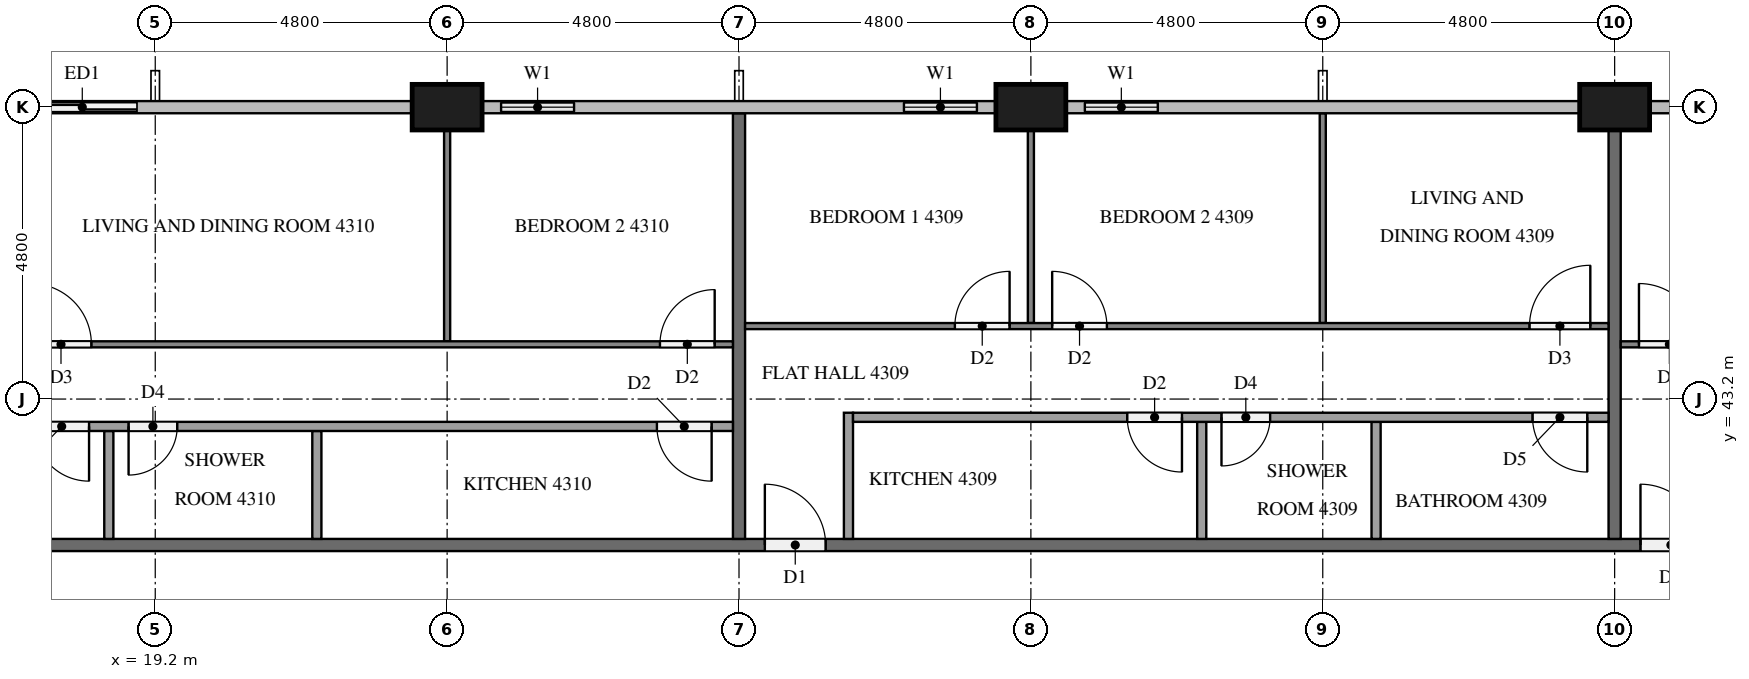
"""IFC4 building model, lengths in metres.
Left out: names, types, materials, properties, quantities, classifications, styles, units other than length and angle.
Written with IfcOpenShell. Run it as: python <this file> out.ifc"""

import sys

from ifc_helpers import new_model, si_unit, direction, frame, frame_2d, origin, origin_2d, place, context, subcontext, project, spatial, rectangle, extrude, element, fill, save


model = new_model("IFC4")
c1 = context("Model", 3, precision=1e-05, world=origin(), true_north=direction((0.0, 1.0)))
c2 = subcontext(c1, "Body", "Model", "MODEL_VIEW")
j1 = project(units=[si_unit("LENGTHUNIT", "METRE"), si_unit("PLANEANGLEUNIT", "RADIAN")], contexts=[c1])
p1 = place(None, origin())
s1 = spatial("IfcSite", under=j1, at=p1, CompositionType="ELEMENT")
p2 = place(p1, origin())
s2 = spatial("IfcBuilding", under=s1, at=p2, CompositionType="ELEMENT")
p3 = place(p2, frame((0.0, 0.0, 166.5)))
s3 = spatial("IfcBuildingStorey", under=s2, at=p3, CompositionType="ELEMENT", Elevation=166.5)
for number, where, z_axis, x_axis in (
    (1, (43.2, 48.0, 0.0), (0.0, 0.0, 1.0), (1.0, 0.0, 0.0)),
    (2, (33.6, 48.0, 0.0), (0.0, 0.0, 1.0), (1.0, 0.0, 0.0)),
    (3, (24.0, 48.0, 0.0), (0.0, 0.0, 1.0), (1.0, 0.0, 0.0)),
):
    element("IfcColumn", number, at=place(p3, frame(where, z_axis=z_axis, x_axis=x_axis)), inside=s3, PredefinedType="COLUMN", context=c2, shape_type="SweptSolid", body=[
        extrude(rectangle(XDim=1.15, YDim=0.75, at=origin_2d()), origin(), (0.0, 0.0, 1.0), 3.2),
    ])
p4 = place(p3, frame((36.0, 48.0, 0.0), z_axis=(0.0, 0.0, 1.0), x_axis=(-1.0, 0.0, 0.0)))
e4 = element("IfcWall", 4, at=p4, inside=s3, PredefinedType="SOLIDWALL", context=c2, shape_type="SweptSolid", body=[
    extrude(rectangle(XDim=1.825, YDim=0.15, at=frame_2d((0.913, 0.0))), origin(), (0.0, 0.0, 1.0), 3.2),
])
p5 = place(p4, frame((0.312, 0.0, 0.9)))
e5 = element("IfcOpeningElement", 5, at=p5, cuts=e4, PredefinedType="OPENING", context=c2, shape_type="SweptSolid", body=[
    extrude(rectangle(XDim=1.2, YDim=1.4, at=frame_2d((0.6, 0.7))), frame((0.0, 0.085, 0.0), z_axis=(0.0, -1.0, 0.0), x_axis=(1.0, 0.0, 0.0)), (0.0, 0.0, 1.0), 0.17),
])
p6 = place(p3, frame((33.025, 48.0, 0.0), z_axis=(0.0, 0.0, 1.0), x_axis=(-1.0, 0.0, 0.0)))
e6 = element("IfcWall", 6, at=p6, inside=s3, PredefinedType="SOLIDWALL", context=c2, shape_type="SweptSolid", body=[
    extrude(rectangle(XDim=1.825, YDim=0.15, at=frame_2d((0.913, 0.0))), origin(), (0.0, 0.0, 1.0), 3.2),
])
p7 = place(p6, frame((0.312, 0.0, 0.9)))
e7 = element("IfcOpeningElement", 7, at=p7, cuts=e6, PredefinedType="OPENING", context=c2, shape_type="SweptSolid", body=[
    extrude(rectangle(XDim=1.2, YDim=1.4, at=frame_2d((0.6, 0.7))), frame((0.0, 0.085, 0.0), z_axis=(0.0, -1.0, 0.0), x_axis=(1.0, 0.0, 0.0)), (0.0, 0.0, 1.0), 0.17),
])
p8 = place(p3, frame((26.4, 48.0, 0.0), z_axis=(0.0, 0.0, 1.0), x_axis=(-1.0, 0.0, 0.0)))
e8 = element("IfcWall", 8, at=p8, inside=s3, PredefinedType="SOLIDWALL", context=c2, shape_type="SweptSolid", body=[
    extrude(rectangle(XDim=1.825, YDim=0.15, at=frame_2d((0.913, 0.0))), origin(), (0.0, 0.0, 1.0), 3.2),
])
p9 = place(p8, frame((0.312, 0.0, 0.9)))
e9 = element("IfcOpeningElement", 9, at=p9, cuts=e8, PredefinedType="OPENING", context=c2, shape_type="SweptSolid", body=[
    extrude(rectangle(XDim=1.2, YDim=1.4, at=frame_2d((0.6, 0.7))), frame((0.0, 0.085, 0.0), z_axis=(0.0, -1.0, 0.0), x_axis=(1.0, 0.0, 0.0)), (0.0, 0.0, 1.0), 0.17),
])
p10 = place(p3, frame((19.2, 48.0, 0.0), z_axis=(0.0, 0.0, 1.0), x_axis=(-1.0, 0.0, 0.0)))
e10 = element("IfcWall", 10, at=p10, inside=s3, PredefinedType="SOLIDWALL", context=c2, shape_type="SweptSolid", body=[
    extrude(rectangle(XDim=4.225, YDim=0.15, at=frame_2d((2.112, 0.0))), origin(), (0.0, 0.0, 1.0), 3.2),
])
p11 = place(p10, frame((0.3, 0.0, 0.0)))
e11 = element("IfcOpeningElement", 11, at=p11, cuts=e10, PredefinedType="OPENING", context=c2, shape_type="SweptSolid", body=[
    extrude(rectangle(XDim=1.8, YDim=2.4, at=frame_2d((0.9, 1.2))), frame((0.0, 0.085, 0.0), z_axis=(0.0, -1.0, 0.0), x_axis=(1.0, 0.0, 0.0)), (0.0, 0.0, 1.0), 0.17),
])
p12 = place(p10, frame((2.712, 0.0, 0.9)))
e12 = element("IfcOpeningElement", 12, at=p12, cuts=e10, PredefinedType="OPENING", context=c2, shape_type="SweptSolid", body=[
    extrude(rectangle(XDim=1.2, YDim=1.4, at=frame_2d((0.6, 0.7))), frame((0.0, 0.085, 0.0), z_axis=(0.0, -1.0, 0.0), x_axis=(1.0, 0.0, 0.0)), (0.0, 0.0, 1.0), 0.17),
])
p13 = place(p3, frame((11.9, 40.8, 0.0), z_axis=(0.0, 0.0, 1.0), x_axis=(1.0, 0.0, 0.0)))
e13 = element("IfcWall", 13, at=p13, inside=s3, PredefinedType="PARTITIONING", context=c2, shape_type="SweptSolid", body=[
    extrude(rectangle(XDim=38.6, YDim=0.2, at=frame_2d((19.3, 0.0))), origin(), (0.0, 0.0, 1.0), 3.2),
])
p14 = place(p13, frame((31.725, 0.0, 0.0)))
e14 = element("IfcOpeningElement", 14, at=p14, cuts=e13, PredefinedType="OPENING", context=c2, shape_type="SweptSolid", body=[
    extrude(rectangle(XDim=1.0, YDim=2.1, at=frame_2d((0.5, 1.05))), frame((0.0, 0.11, 0.0), z_axis=(0.0, -1.0, 0.0), x_axis=(1.0, 0.0, 0.0)), (0.0, 0.0, 1.0), 0.22),
])
p15 = place(p13, frame((17.325, 0.0, 0.0)))
e15 = element("IfcOpeningElement", 15, at=p15, cuts=e13, PredefinedType="OPENING", context=c2, shape_type="SweptSolid", body=[
    extrude(rectangle(XDim=1.0, YDim=2.1, at=frame_2d((0.5, 1.05))), frame((0.0, 0.11, 0.0), z_axis=(0.0, -1.0, 0.0), x_axis=(1.0, 0.0, 0.0)), (0.0, 0.0, 1.0), 0.22),
])
p16 = place(p13, frame((0.525, 0.0, 0.0)))
e16 = element("IfcOpeningElement", 16, at=p16, cuts=e13, PredefinedType="OPENING", context=c2, shape_type="SweptSolid", body=[
    extrude(rectangle(XDim=1.0, YDim=2.1, at=frame_2d((0.5, 1.05))), frame((0.0, 0.11, 0.0), z_axis=(0.0, -1.0, 0.0), x_axis=(1.0, 0.0, 0.0)), (0.0, 0.0, 1.0), 0.22),
])
p17 = place(p3, frame((43.2, 47.625, 0.0), z_axis=(0.0, 0.0, 1.0), x_axis=(0.0, -1.0, 0.0)))
e17 = element("IfcWall", 17, at=p17, inside=s3, PredefinedType="PARTITIONING", context=c2, shape_type="SweptSolid", body=[
    extrude(rectangle(XDim=6.725, YDim=0.2, at=frame_2d((3.363, 0.0))), origin(), (0.0, 0.0, 1.0), 3.2),
])
p18 = place(p3, frame((28.8, 47.9, 0.0), z_axis=(0.0, 0.0, 1.0), x_axis=(0.0, -1.0, 0.0)))
e18 = element("IfcWall", 18, at=p18, inside=s3, PredefinedType="PARTITIONING", context=c2, shape_type="SweptSolid", body=[
    extrude(rectangle(XDim=7.0, YDim=0.2, at=frame_2d((3.5, 0.0))), origin(), (0.0, 0.0, 1.0), 3.2),
])
p19 = place(p3, frame((43.3, 44.1, 0.0), z_axis=(0.0, 0.0, 1.0), x_axis=(1.0, 0.0, 0.0)))
e19 = element("IfcWall", 19, at=p19, inside=s3, PredefinedType="PARTITIONING", context=c2, shape_type="SweptSolid", body=[
    extrude(rectangle(XDim=7.0, YDim=0.1, at=frame_2d((3.5, 0.0))), origin(), (0.0, 0.0, 1.0), 3.2),
])
p20 = place(p19, frame((0.3, 0.0, 0.0)))
e20 = element("IfcOpeningElement", 20, at=p20, cuts=e19, PredefinedType="OPENING", context=c2, shape_type="SweptSolid", body=[
    extrude(rectangle(XDim=1.0, YDim=2.1, at=frame_2d((0.5, 1.05))), frame((0.0, 0.06, 0.0), z_axis=(0.0, -1.0, 0.0), x_axis=(1.0, 0.0, 0.0)), (0.0, 0.0, 1.0), 0.12),
])
p21 = place(p3, frame((33.6, 44.45, 0.0), z_axis=(0.0, 0.0, 1.0), x_axis=(0.0, 1.0, 0.0)))
e21 = element("IfcWall", 21, at=p21, inside=s3, PredefinedType="PARTITIONING", context=c2, shape_type="SweptSolid", body=[
    extrude(rectangle(XDim=3.175, YDim=0.1, at=frame_2d((1.587, 0.0))), origin(), (0.0, 0.0, 1.0), 3.2),
])
p22 = place(p3, frame((38.4, 44.45, 0.0), z_axis=(0.0, 0.0, 1.0), x_axis=(0.0, 1.0, 0.0)))
e22 = element("IfcWall", 22, at=p22, inside=s3, PredefinedType="PARTITIONING", context=c2, shape_type="SweptSolid", body=[
    extrude(rectangle(XDim=3.45, YDim=0.1, at=frame_2d((1.725, 0.0))), origin(), (0.0, 0.0, 1.0), 3.2),
])
p23 = place(p3, frame((28.9, 44.4, 0.0), z_axis=(0.0, 0.0, 1.0), x_axis=(1.0, 0.0, 0.0)))
e23 = element("IfcWall", 23, at=p23, inside=s3, PredefinedType="PARTITIONING", context=c2, shape_type="SweptSolid", body=[
    extrude(rectangle(XDim=14.2, YDim=0.1, at=frame_2d((7.1, 0.0))), origin(), (0.0, 0.0, 1.0), 3.2),
])
p24 = place(p23, frame((3.45, 0.0, 0.0)))
e24 = element("IfcOpeningElement", 24, at=p24, cuts=e23, PredefinedType="OPENING", context=c2, shape_type="SweptSolid", body=[
    extrude(rectangle(XDim=0.9, YDim=2.1, at=frame_2d((0.45, 1.05))), frame((0.0, 0.06, 0.0), z_axis=(0.0, -1.0, 0.0), x_axis=(1.0, 0.0, 0.0)), (0.0, 0.0, 1.0), 0.12),
])
p25 = place(p23, frame((5.05, 0.0, 0.0)))
e25 = element("IfcOpeningElement", 25, at=p25, cuts=e23, PredefinedType="OPENING", context=c2, shape_type="SweptSolid", body=[
    extrude(rectangle(XDim=0.9, YDim=2.1, at=frame_2d((0.45, 1.05))), frame((0.0, 0.06, 0.0), z_axis=(0.0, -1.0, 0.0), x_axis=(1.0, 0.0, 0.0)), (0.0, 0.0, 1.0), 0.12),
])
p26 = place(p23, frame((12.9, 0.0, 0.0)))
e26 = element("IfcOpeningElement", 26, at=p26, cuts=e23, PredefinedType="OPENING", context=c2, shape_type="SweptSolid", body=[
    extrude(rectangle(XDim=1.0, YDim=2.1, at=frame_2d((0.5, 1.05))), frame((0.0, 0.06, 0.0), z_axis=(0.0, -1.0, 0.0), x_axis=(1.0, 0.0, 0.0)), (0.0, 0.0, 1.0), 0.12),
])
for number, where, z_axis, x_axis in (
    (27, (36.41, 40.9, 0.0), (0.0, 0.0, 1.0), (0.0, 1.0, 0.0)),
    (28, (39.277, 40.9, 0.0), (0.0, 0.0, 1.0), (0.0, 1.0, 0.0)),
):
    element("IfcWall", number, at=place(p3, frame(where, z_axis=z_axis, x_axis=x_axis)), inside=s3, PredefinedType="PARTITIONING", context=c2, shape_type="SweptSolid", body=[
        extrude(rectangle(XDim=1.925, YDim=0.15, at=frame_2d((0.962, 0.0))), origin(), (0.0, 0.0, 1.0), 3.2),
    ])
p27 = place(p3, frame((30.6, 40.9, 0.0), z_axis=(0.0, 0.0, 1.0), x_axis=(0.0, 1.0, 0.0)))
e29 = element("IfcWall", 29, at=p27, inside=s3, PredefinedType="PARTITIONING", context=c2, shape_type="SweptSolid", body=[
    extrude(rectangle(XDim=2.075, YDim=0.15, at=frame_2d((1.038, 0.0))), origin(), (0.0, 0.0, 1.0), 3.2),
])
p28 = place(p3, frame((43.1, 42.9, 0.0), z_axis=(0.0, 0.0, 1.0), x_axis=(-1.0, 0.0, 0.0)))
e30 = element("IfcWall", 30, at=p28, inside=s3, PredefinedType="PARTITIONING", context=c2, shape_type="SweptSolid", body=[
    extrude(rectangle(XDim=12.425, YDim=0.15, at=frame_2d((6.212, 0.0))), origin(), (0.0, 0.0, 1.0), 3.2),
])
p29 = place(p28, frame((7.015, 0.0, 0.0)))
e31 = element("IfcOpeningElement", 31, at=p29, cuts=e30, PredefinedType="OPENING", context=c2, shape_type="SweptSolid", body=[
    extrude(rectangle(XDim=0.9, YDim=2.1, at=frame_2d((0.45, 1.05))), frame((0.0, 0.085, 0.0), z_axis=(0.0, -1.0, 0.0), x_axis=(1.0, 0.0, 0.0)), (0.0, 0.0, 1.0), 0.17),
])
p30 = place(p28, frame((5.565, 0.0, 0.0)))
e32 = element("IfcOpeningElement", 32, at=p30, cuts=e30, PredefinedType="OPENING", context=c2, shape_type="SweptSolid", body=[
    extrude(rectangle(XDim=0.8, YDim=2.1, at=frame_2d((0.4, 1.05))), frame((0.0, 0.085, 0.0), z_axis=(0.0, -1.0, 0.0), x_axis=(1.0, 0.0, 0.0)), (0.0, 0.0, 1.0), 0.17),
])
p31 = place(p28, frame((0.35, 0.0, 0.0)))
e33 = element("IfcOpeningElement", 33, at=p31, cuts=e30, PredefinedType="OPENING", context=c2, shape_type="SweptSolid", body=[
    extrude(rectangle(XDim=0.9, YDim=2.1, at=frame_2d((0.45, 1.05))), frame((0.0, 0.085, 0.0), z_axis=(0.0, -1.0, 0.0), x_axis=(1.0, 0.0, 0.0)), (0.0, 0.0, 1.0), 0.17),
])
p32 = place(p3, frame((24.0, 44.15, 0.0), z_axis=(0.0, 0.0, 1.0), x_axis=(0.0, 1.0, 0.0)))
e34 = element("IfcWall", 34, at=p32, inside=s3, PredefinedType="PARTITIONING", context=c2, shape_type="SweptSolid", body=[
    extrude(rectangle(XDim=3.475, YDim=0.1, at=frame_2d((1.738, 0.0))), origin(), (0.0, 0.0, 1.0), 3.2),
])
p33 = place(p3, frame((12.1, 44.1, 0.0), z_axis=(0.0, 0.0, 1.0), x_axis=(1.0, 0.0, 0.0)))
e35 = element("IfcWall", 35, at=p33, inside=s3, PredefinedType="PARTITIONING", context=c2, shape_type="SweptSolid", body=[
    extrude(rectangle(XDim=16.6, YDim=0.1, at=frame_2d((8.3, 0.0))), origin(), (0.0, 0.0, 1.0), 3.2),
])
p34 = place(p33, frame((3.45, 0.0, 0.0)))
e36 = element("IfcOpeningElement", 36, at=p34, cuts=e35, PredefinedType="OPENING", context=c2, shape_type="SweptSolid", body=[
    extrude(rectangle(XDim=0.9, YDim=2.1, at=frame_2d((0.45, 1.05))), frame((0.0, 0.06, 0.0), z_axis=(0.0, -1.0, 0.0), x_axis=(1.0, 0.0, 0.0)), (0.0, 0.0, 1.0), 0.12),
])
p35 = place(p33, frame((5.05, 0.0, 0.0)))
e37 = element("IfcOpeningElement", 37, at=p35, cuts=e35, PredefinedType="OPENING", context=c2, shape_type="SweptSolid", body=[
    extrude(rectangle(XDim=1.0, YDim=2.1, at=frame_2d((0.5, 1.05))), frame((0.0, 0.06, 0.0), z_axis=(0.0, -1.0, 0.0), x_axis=(1.0, 0.0, 0.0)), (0.0, 0.0, 1.0), 0.12),
])
p36 = place(p33, frame((15.4, 0.0, 0.0)))
e38 = element("IfcOpeningElement", 38, at=p36, cuts=e35, PredefinedType="OPENING", context=c2, shape_type="SweptSolid", body=[
    extrude(rectangle(XDim=0.9, YDim=2.1, at=frame_2d((0.45, 1.05))), frame((0.0, 0.06, 0.0), z_axis=(0.0, -1.0, 0.0), x_axis=(1.0, 0.0, 0.0)), (0.0, 0.0, 1.0), 0.12),
])
for number, where, z_axis, x_axis in (
    (39, (18.437, 40.9, 0.0), (0.0, 0.0, 1.0), (0.0, 1.0, 0.0)),
    (40, (21.858, 40.9, 0.0), (0.0, 0.0, 1.0), (0.0, 1.0, 0.0)),
):
    element("IfcWall", number, at=place(p3, frame(where, z_axis=z_axis, x_axis=x_axis)), inside=s3, PredefinedType="PARTITIONING", context=c2, shape_type="SweptSolid", body=[
        extrude(rectangle(XDim=1.775, YDim=0.15, at=frame_2d((0.888, 0.0))), origin(), (0.0, 0.0, 1.0), 3.2),
    ])
p37 = place(p3, frame((28.7, 42.75, 0.0), z_axis=(0.0, 0.0, 1.0), x_axis=(-1.0, 0.0, 0.0)))
e41 = element("IfcWall", 41, at=p37, inside=s3, PredefinedType="PARTITIONING", context=c2, shape_type="SweptSolid", body=[
    extrude(rectangle(XDim=14.825, YDim=0.15, at=frame_2d((7.413, 0.0))), origin(), (0.0, 0.0, 1.0), 3.2),
])
p38 = place(p37, frame((10.588, 0.0, 0.0)))
e42 = element("IfcOpeningElement", 42, at=p38, cuts=e41, PredefinedType="OPENING", context=c2, shape_type="SweptSolid", body=[
    extrude(rectangle(XDim=0.9, YDim=2.1, at=frame_2d((0.45, 1.05))), frame((0.0, 0.085, 0.0), z_axis=(0.0, -1.0, 0.0), x_axis=(1.0, 0.0, 0.0)), (0.0, 0.0, 1.0), 0.17),
])
p39 = place(p37, frame((9.138, 0.0, 0.0)))
e43 = element("IfcOpeningElement", 43, at=p39, cuts=e41, PredefinedType="OPENING", context=c2, shape_type="SweptSolid", body=[
    extrude(rectangle(XDim=0.8, YDim=2.1, at=frame_2d((0.4, 1.05))), frame((0.0, 0.085, 0.0), z_axis=(0.0, -1.0, 0.0), x_axis=(1.0, 0.0, 0.0)), (0.0, 0.0, 1.0), 0.17),
])
p40 = place(p37, frame((0.35, 0.0, 0.0)))
e44 = element("IfcOpeningElement", 44, at=p40, cuts=e41, PredefinedType="OPENING", context=c2, shape_type="SweptSolid", body=[
    extrude(rectangle(XDim=0.9, YDim=2.1, at=frame_2d((0.45, 1.05))), frame((0.0, 0.085, 0.0), z_axis=(0.0, -1.0, 0.0), x_axis=(1.0, 0.0, 0.0)), (0.0, 0.0, 1.0), 0.17),
])
p41 = place(p5, origin())
e45 = element("IfcWindow", 45, at=p41, inside=s3, PartitioningType="SINGLE_PANEL", PredefinedType="WINDOW", context=c2, shape_type="SweptSolid", body=[
    extrude(rectangle(XDim=1.2, YDim=1.4, at=frame_2d((0.6, 0.7))), frame((0.0, 0.03, 0.0), z_axis=(0.0, -1.0, 0.0), x_axis=(1.0, 0.0, 0.0)), (0.0, 0.0, 1.0), 0.06),
])
fill(e5, e45)
p42 = place(p7, origin())
e46 = element("IfcWindow", 46, at=p42, inside=s3, PartitioningType="SINGLE_PANEL", PredefinedType="WINDOW", context=c2, shape_type="SweptSolid", body=[
    extrude(rectangle(XDim=1.2, YDim=1.4, at=frame_2d((0.6, 0.7))), frame((0.0, 0.03, 0.0), z_axis=(0.0, -1.0, 0.0), x_axis=(1.0, 0.0, 0.0)), (0.0, 0.0, 1.0), 0.06),
])
fill(e7, e46)
p43 = place(p9, origin())
e47 = element("IfcWindow", 47, at=p43, inside=s3, PartitioningType="SINGLE_PANEL", PredefinedType="WINDOW", context=c2, shape_type="SweptSolid", body=[
    extrude(rectangle(XDim=1.2, YDim=1.4, at=frame_2d((0.6, 0.7))), frame((0.0, 0.03, 0.0), z_axis=(0.0, -1.0, 0.0), x_axis=(1.0, 0.0, 0.0)), (0.0, 0.0, 1.0), 0.06),
])
fill(e9, e47)
p44 = place(p11, origin())
e48 = element("IfcDoor", 48, at=p44, inside=s3, OperationType="SLIDING_TO_RIGHT", PredefinedType="DOOR", context=c2, shape_type="SweptSolid", body=[
    extrude(rectangle(XDim=1.8, YDim=2.4, at=frame_2d((0.9, 1.2))), frame((0.0, 0.025, 0.0), z_axis=(0.0, -1.0, 0.0), x_axis=(1.0, 0.0, 0.0)), (0.0, 0.0, 1.0), 0.05),
])
fill(e11, e48)
p45 = place(p14, origin())
e49 = element("IfcDoor", 49, at=p45, inside=s3, OperationType="SINGLE_SWING_LEFT", PredefinedType="DOOR", context=c2, shape_type="SweptSolid", body=[
    extrude(rectangle(XDim=1.0, YDim=2.1, at=frame_2d((0.5, 1.05))), frame((0.0, 0.025, 0.0), z_axis=(0.0, -1.0, 0.0), x_axis=(1.0, 0.0, 0.0)), (0.0, 0.0, 1.0), 0.05),
])
fill(e14, e49)
p46 = place(p15, origin())
e50 = element("IfcDoor", 50, at=p46, inside=s3, OperationType="SINGLE_SWING_LEFT", PredefinedType="DOOR", context=c2, shape_type="SweptSolid", body=[
    extrude(rectangle(XDim=1.0, YDim=2.1, at=frame_2d((0.5, 1.05))), frame((0.0, 0.025, 0.0), z_axis=(0.0, -1.0, 0.0), x_axis=(1.0, 0.0, 0.0)), (0.0, 0.0, 1.0), 0.05),
])
fill(e15, e50)
p47 = place(p20, origin())
e51 = element("IfcDoor", 51, at=p47, inside=s3, OperationType="SINGLE_SWING_LEFT", PredefinedType="DOOR", context=c2, shape_type="SweptSolid", body=[
    extrude(rectangle(XDim=1.0, YDim=2.1, at=frame_2d((0.5, 1.05))), frame((0.0, 0.025, 0.0), z_axis=(0.0, -1.0, 0.0), x_axis=(1.0, 0.0, 0.0)), (0.0, 0.0, 1.0), 0.05),
])
fill(e20, e51)
p48 = place(p24, origin())
e52 = element("IfcDoor", 52, at=p48, inside=s3, OperationType="SINGLE_SWING_RIGHT", PredefinedType="DOOR", context=c2, shape_type="SweptSolid", body=[
    extrude(rectangle(XDim=0.9, YDim=2.1, at=frame_2d((0.45, 1.05))), frame((0.0, 0.025, 0.0), z_axis=(0.0, -1.0, 0.0), x_axis=(1.0, 0.0, 0.0)), (0.0, 0.0, 1.0), 0.05),
])
fill(e24, e52)
p49 = place(p25, origin())
e53 = element("IfcDoor", 53, at=p49, inside=s3, OperationType="SINGLE_SWING_LEFT", PredefinedType="DOOR", context=c2, shape_type="SweptSolid", body=[
    extrude(rectangle(XDim=0.9, YDim=2.1, at=frame_2d((0.45, 1.05))), frame((0.0, 0.025, 0.0), z_axis=(0.0, -1.0, 0.0), x_axis=(1.0, 0.0, 0.0)), (0.0, 0.0, 1.0), 0.05),
])
fill(e25, e53)
p50 = place(p26, origin())
e54 = element("IfcDoor", 54, at=p50, inside=s3, OperationType="SINGLE_SWING_RIGHT", PredefinedType="DOOR", context=c2, shape_type="SweptSolid", body=[
    extrude(rectangle(XDim=1.0, YDim=2.1, at=frame_2d((0.5, 1.05))), frame((0.0, 0.025, 0.0), z_axis=(0.0, -1.0, 0.0), x_axis=(1.0, 0.0, 0.0)), (0.0, 0.0, 1.0), 0.05),
])
fill(e26, e54)
p51 = place(p29, origin())
e55 = element("IfcDoor", 55, at=p51, inside=s3, OperationType="SINGLE_SWING_LEFT", PredefinedType="DOOR", context=c2, shape_type="SweptSolid", body=[
    extrude(rectangle(XDim=0.9, YDim=2.1, at=frame_2d((0.45, 1.05))), frame((0.0, 0.025, 0.0), z_axis=(0.0, -1.0, 0.0), x_axis=(1.0, 0.0, 0.0)), (0.0, 0.0, 1.0), 0.05),
])
fill(e31, e55)
p52 = place(p30, origin())
e56 = element("IfcDoor", 56, at=p52, inside=s3, OperationType="SINGLE_SWING_RIGHT", PredefinedType="DOOR", context=c2, shape_type="SweptSolid", body=[
    extrude(rectangle(XDim=0.8, YDim=2.1, at=frame_2d((0.4, 1.05))), frame((0.0, 0.025, 0.0), z_axis=(0.0, -1.0, 0.0), x_axis=(1.0, 0.0, 0.0)), (0.0, 0.0, 1.0), 0.05),
])
fill(e32, e56)
p53 = place(p31, origin())
e57 = element("IfcDoor", 57, at=p53, inside=s3, OperationType="SINGLE_SWING_LEFT", PredefinedType="DOOR", context=c2, shape_type="SweptSolid", body=[
    extrude(rectangle(XDim=0.9, YDim=2.1, at=frame_2d((0.45, 1.05))), frame((0.0, 0.025, 0.0), z_axis=(0.0, -1.0, 0.0), x_axis=(1.0, 0.0, 0.0)), (0.0, 0.0, 1.0), 0.05),
])
fill(e33, e57)
p54 = place(p35, origin())
e58 = element("IfcDoor", 58, at=p54, inside=s3, OperationType="SINGLE_SWING_LEFT", PredefinedType="DOOR", context=c2, shape_type="SweptSolid", body=[
    extrude(rectangle(XDim=1.0, YDim=2.1, at=frame_2d((0.5, 1.05))), frame((0.0, 0.025, 0.0), z_axis=(0.0, -1.0, 0.0), x_axis=(1.0, 0.0, 0.0)), (0.0, 0.0, 1.0), 0.05),
])
fill(e37, e58)
p55 = place(p36, origin())
e59 = element("IfcDoor", 59, at=p55, inside=s3, OperationType="SINGLE_SWING_RIGHT", PredefinedType="DOOR", context=c2, shape_type="SweptSolid", body=[
    extrude(rectangle(XDim=0.9, YDim=2.1, at=frame_2d((0.45, 1.05))), frame((0.0, 0.025, 0.0), z_axis=(0.0, -1.0, 0.0), x_axis=(1.0, 0.0, 0.0)), (0.0, 0.0, 1.0), 0.05),
])
fill(e38, e59)
p56 = place(p38, origin())
e60 = element("IfcDoor", 60, at=p56, inside=s3, OperationType="SINGLE_SWING_LEFT", PredefinedType="DOOR", context=c2, shape_type="SweptSolid", body=[
    extrude(rectangle(XDim=0.9, YDim=2.1, at=frame_2d((0.45, 1.05))), frame((0.0, 0.025, 0.0), z_axis=(0.0, -1.0, 0.0), x_axis=(1.0, 0.0, 0.0)), (0.0, 0.0, 1.0), 0.05),
])
fill(e42, e60)
p57 = place(p39, origin())
e61 = element("IfcDoor", 61, at=p57, inside=s3, OperationType="SINGLE_SWING_RIGHT", PredefinedType="DOOR", context=c2, shape_type="SweptSolid", body=[
    extrude(rectangle(XDim=0.8, YDim=2.1, at=frame_2d((0.4, 1.05))), frame((0.0, 0.025, 0.0), z_axis=(0.0, -1.0, 0.0), x_axis=(1.0, 0.0, 0.0)), (0.0, 0.0, 1.0), 0.05),
])
fill(e43, e61)
p58 = place(p40, origin())
e62 = element("IfcDoor", 62, at=p58, inside=s3, OperationType="SINGLE_SWING_LEFT", PredefinedType="DOOR", context=c2, shape_type="SweptSolid", body=[
    extrude(rectangle(XDim=0.9, YDim=2.1, at=frame_2d((0.45, 1.05))), frame((0.0, 0.025, 0.0), z_axis=(0.0, -1.0, 0.0), x_axis=(1.0, 0.0, 0.0)), (0.0, 0.0, 1.0), 0.05),
])
fill(e44, e62)
save(model, sys.argv[1])
